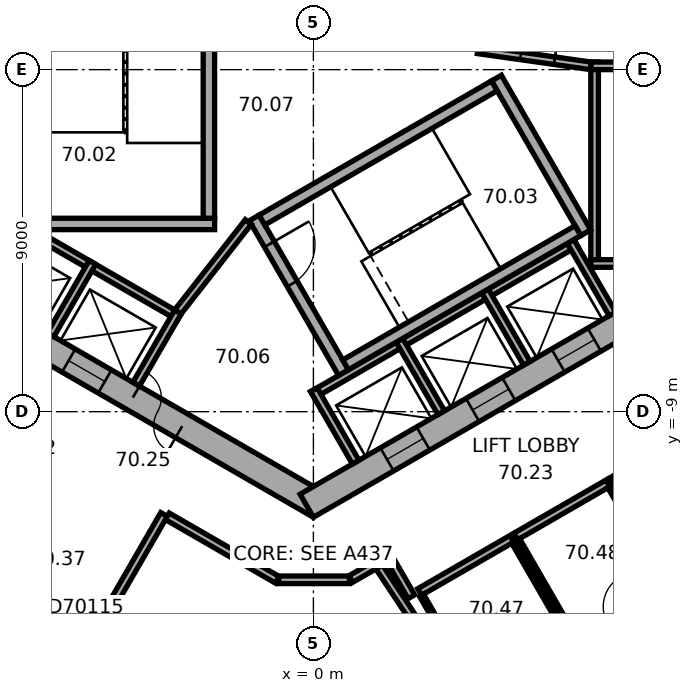
"""IFC4 building model, lengths in metres.
Left out: names, types, materials, properties, quantities, classifications, styles, units other than length and angle.
Written with IfcOpenShell. Run it as: python <this file> out.ifc"""

import sys

from ifc_helpers import new_model, si_unit, direction, frame, frame_2d, origin, place, context, subcontext, project, spatial, rectangle, extrude, element, fill, save


model = new_model("IFC4")
c1 = context("Model", 3, precision=1e-05, world=origin(), true_north=direction((0.0, 1.0)))
c2 = subcontext(c1, "Body", "Model", "MODEL_VIEW")
j1 = project(units=[si_unit("LENGTHUNIT", "METRE"), si_unit("PLANEANGLEUNIT", "RADIAN")], contexts=[c1])
p1 = place(None, origin())
s1 = spatial("IfcSite", under=j1, at=p1, CompositionType="ELEMENT")
p2 = place(p1, origin())
s2 = spatial("IfcBuilding", under=s1, at=p2, CompositionType="ELEMENT")
p3 = place(p2, frame((0.0, 0.0, 285.7)))
s3 = spatial("IfcBuildingStorey", under=s2, at=p3, CompositionType="ELEMENT", Elevation=285.7)
p4 = place(p3, frame((-10.025, -5.586, 0.0), z_axis=(0.0, 0.0, 1.0), x_axis=(0.866026453023, -0.499998182661, 0.0)))
e1 = element("IfcWall", 1, at=p4, inside=s3, PredefinedType="SHEAR", context=c2, shape_type="SweptSolid", body=[
    extrude(rectangle(XDim=11.778, YDim=0.7, at=frame_2d((5.889, 0.0))), origin(), (0.0, 0.0, 1.0), 3.7),
])
p5 = place(p4, frame((6.089, 0.0, 0.0)))
e2 = element("IfcOpeningElement", 2, at=p5, cuts=e1, PredefinedType="OPENING", context=c2, shape_type="SweptSolid", body=[
    extrude(rectangle(XDim=1.5, YDim=2.1, at=frame_2d((0.75, 1.05))), frame((0.0, 0.36, 0.0), z_axis=(0.0, -1.0, 0.0), x_axis=(1.0, 0.0, 0.0)), (0.0, 0.0, 1.0), 0.72),
])
p6 = place(p4, frame((1.539, 0.0, 0.0)))
e3 = element("IfcOpeningElement", 3, at=p6, cuts=e1, PredefinedType="OPENING", context=c2, shape_type="SweptSolid", body=[
    extrude(rectangle(XDim=1.1, YDim=2.1, at=frame_2d((0.55, 1.05))), frame((0.0, 0.36, 0.0), z_axis=(0.0, -1.0, 0.0), x_axis=(1.0, 0.0, 0.0)), (0.0, 0.0, 1.0), 0.72),
])
p7 = place(p4, frame((4.139, 0.0, 0.0)))
e4 = element("IfcOpeningElement", 4, at=p7, cuts=e1, PredefinedType="OPENING", context=c2, shape_type="SweptSolid", body=[
    extrude(rectangle(XDim=1.1, YDim=2.1, at=frame_2d((0.55, 1.05))), frame((0.0, 0.36, 0.0), z_axis=(0.0, -1.0, 0.0), x_axis=(1.0, 0.0, 0.0)), (0.0, 0.0, 1.0), 0.72),
])
p8 = place(p3, frame((-0.175, -11.475, 0.0), z_axis=(0.0, 0.0, 1.0), x_axis=(0.866026453023, 0.499998182661, 0.0)))
e5 = element("IfcWall", 5, at=p8, inside=s3, PredefinedType="SHEAR", context=c2, shape_type="SweptSolid", body=[
    extrude(rectangle(XDim=11.778, YDim=0.7, at=frame_2d((5.889, 0.0))), origin(), (0.0, 0.0, 1.0), 3.7),
])
p9 = place(p8, frame((2.439, 0.0, 0.0)))
e6 = element("IfcOpeningElement", 6, at=p9, cuts=e5, PredefinedType="OPENING", context=c2, shape_type="SweptSolid", body=[
    extrude(rectangle(XDim=1.1, YDim=2.1, at=frame_2d((0.55, 1.05))), frame((0.0, 0.36, 0.0), z_axis=(0.0, -1.0, 0.0), x_axis=(1.0, 0.0, 0.0)), (0.0, 0.0, 1.0), 0.72),
])
p10 = place(p8, frame((5.039, 0.0, 0.0)))
e7 = element("IfcOpeningElement", 7, at=p10, cuts=e5, PredefinedType="OPENING", context=c2, shape_type="SweptSolid", body=[
    extrude(rectangle(XDim=1.1, YDim=2.1, at=frame_2d((0.55, 1.05))), frame((0.0, 0.36, 0.0), z_axis=(0.0, -1.0, 0.0), x_axis=(1.0, 0.0, 0.0)), (0.0, 0.0, 1.0), 0.72),
])
p11 = place(p8, frame((7.639, 0.0, 0.0)))
e8 = element("IfcOpeningElement", 8, at=p11, cuts=e5, PredefinedType="OPENING", context=c2, shape_type="SweptSolid", body=[
    extrude(rectangle(XDim=1.1, YDim=2.1, at=frame_2d((0.55, 1.05))), frame((0.0, 0.36, 0.0), z_axis=(0.0, -1.0, 0.0), x_axis=(1.0, 0.0, 0.0)), (0.0, 0.0, 1.0), 0.72),
])
p12 = place(p3, frame((-16.626, -12.629, 0.0), z_axis=(0.0, 0.0, 1.0), x_axis=(0.866026460444, -0.499998169808, 0.0)))
e9 = element("IfcWall", 9, at=p12, inside=s3, PredefinedType="STANDARD", context=c2, shape_type="SweptSolid", body=[
    extrude(rectangle(XDim=17.731, YDim=0.2, at=frame_2d((8.866, 0.0))), origin(), (0.0, 0.0, 1.0), 3.7),
])
p13 = place(p12, frame((1.203, 0.0, 0.9)))
e10 = element("IfcOpeningElement", 10, at=p13, cuts=e9, PredefinedType="OPENING", context=c2, shape_type="SweptSolid", body=[
    extrude(rectangle(XDim=2.0, YDim=2.0, at=frame_2d((1.0, 1.0))), frame((0.0, 0.11, 0.0), z_axis=(0.0, -1.0, 0.0), x_axis=(1.0, 0.0, 0.0)), (0.0, 0.0, 1.0), 0.22),
])
p14 = place(p12, frame((4.535, 0.0, 0.9)))
e11 = element("IfcOpeningElement", 11, at=p14, cuts=e9, PredefinedType="OPENING", context=c2, shape_type="SweptSolid", body=[
    extrude(rectangle(XDim=2.0, YDim=2.0, at=frame_2d((1.0, 1.0))), frame((0.0, 0.11, 0.0), z_axis=(0.0, -1.0, 0.0), x_axis=(1.0, 0.0, 0.0)), (0.0, 0.0, 1.0), 0.22),
])
p15 = place(p12, frame((7.867, 0.0, 0.9)))
e12 = element("IfcOpeningElement", 12, at=p15, cuts=e9, PredefinedType="OPENING", context=c2, shape_type="SweptSolid", body=[
    extrude(rectangle(XDim=2.0, YDim=2.0, at=frame_2d((1.0, 1.0))), frame((0.0, 0.11, 0.0), z_axis=(0.0, -1.0, 0.0), x_axis=(1.0, 0.0, 0.0)), (0.0, 0.0, 1.0), 0.22),
])
p16 = place(p12, frame((11.198, 0.0, 0.9)))
e13 = element("IfcOpeningElement", 13, at=p16, cuts=e9, PredefinedType="OPENING", context=c2, shape_type="SweptSolid", body=[
    extrude(rectangle(XDim=2.0, YDim=2.0, at=frame_2d((1.0, 1.0))), frame((0.0, 0.11, 0.0), z_axis=(0.0, -1.0, 0.0), x_axis=(1.0, 0.0, 0.0)), (0.0, 0.0, 1.0), 0.22),
])
p17 = place(p12, frame((14.53, 0.0, 0.9)))
e14 = element("IfcOpeningElement", 14, at=p17, cuts=e9, PredefinedType="OPENING", context=c2, shape_type="SweptSolid", body=[
    extrude(rectangle(XDim=2.0, YDim=2.0, at=frame_2d((1.0, 1.0))), frame((0.0, 0.11, 0.0), z_axis=(0.0, -1.0, 0.0), x_axis=(1.0, 0.0, 0.0)), (0.0, 0.0, 1.0), 0.22),
])
p18 = place(p3, frame((2.58, -21.377, 0.0), z_axis=(0.0, 0.0, 1.0), x_axis=(0.833888592176, 0.551932800112, 0.0)))
e15 = element("IfcWall", 15, at=p18, inside=s3, PredefinedType="STANDARD", context=c2, shape_type="SweptSolid", body=[
    extrude(rectangle(XDim=17.731, YDim=0.2, at=frame_2d((8.866, 0.0))), origin(), (0.0, 0.0, 1.0), 3.7),
])
p19 = place(p18, frame((1.202, 0.0, 0.9)))
e16 = element("IfcOpeningElement", 16, at=p19, cuts=e15, PredefinedType="OPENING", context=c2, shape_type="SweptSolid", body=[
    extrude(rectangle(XDim=2.0, YDim=2.0, at=frame_2d((1.0, 1.0))), frame((0.0, 0.11, 0.0), z_axis=(0.0, -1.0, 0.0), x_axis=(1.0, 0.0, 0.0)), (0.0, 0.0, 1.0), 0.22),
])
p20 = place(p18, frame((4.533, 0.0, 0.9)))
e17 = element("IfcOpeningElement", 17, at=p20, cuts=e15, PredefinedType="OPENING", context=c2, shape_type="SweptSolid", body=[
    extrude(rectangle(XDim=2.0, YDim=2.0, at=frame_2d((1.0, 1.0))), frame((0.0, 0.11, 0.0), z_axis=(0.0, -1.0, 0.0), x_axis=(1.0, 0.0, 0.0)), (0.0, 0.0, 1.0), 0.22),
])
p21 = place(p18, frame((7.865, 0.0, 0.9)))
e18 = element("IfcOpeningElement", 18, at=p21, cuts=e15, PredefinedType="OPENING", context=c2, shape_type="SweptSolid", body=[
    extrude(rectangle(XDim=2.0, YDim=2.0, at=frame_2d((1.0, 1.0))), frame((0.0, 0.11, 0.0), z_axis=(0.0, -1.0, 0.0), x_axis=(1.0, 0.0, 0.0)), (0.0, 0.0, 1.0), 0.22),
])
p22 = place(p18, frame((11.197, 0.0, 0.9)))
e19 = element("IfcOpeningElement", 19, at=p22, cuts=e15, PredefinedType="OPENING", context=c2, shape_type="SweptSolid", body=[
    extrude(rectangle(XDim=2.0, YDim=2.0, at=frame_2d((1.0, 1.0))), frame((0.0, 0.11, 0.0), z_axis=(0.0, -1.0, 0.0), x_axis=(1.0, 0.0, 0.0)), (0.0, 0.0, 1.0), 0.22),
])
p23 = place(p18, frame((14.528, 0.0, 0.9)))
e20 = element("IfcOpeningElement", 20, at=p23, cuts=e15, PredefinedType="OPENING", context=c2, shape_type="SweptSolid", body=[
    extrude(rectangle(XDim=2.0, YDim=2.0, at=frame_2d((1.0, 1.0))), frame((0.0, 0.11, 0.0), z_axis=(0.0, -1.0, 0.0), x_axis=(1.0, 0.0, 0.0)), (0.0, 0.0, 1.0), 0.22),
])
p24 = place(p3, frame((7.4, -5.2, 0.0), z_axis=(0.0, 0.0, 1.0), x_axis=(0.0, 1.0, 0.0)))
e21 = element("IfcWall", 21, at=p24, inside=s3, PredefinedType="PARTITIONING", context=c2, shape_type="SweptSolid", body=[
    extrude(rectangle(XDim=5.4, YDim=0.2, at=frame_2d((2.7, 0.0))), origin(), (0.0, 0.0, 1.0), 3.42),
])
for number, where, z_axis, x_axis in (
    (22, (7.3, -5.1, 0.0), (0.0, 0.0, 1.0), (1.0, 0.0, 0.0)),
    (23, (7.3, 0.1, 0.0), (0.0, 0.0, 1.0), (1.0, 0.0, 0.0)),
):
    element("IfcWall", number, at=place(p3, frame(where, z_axis=z_axis, x_axis=x_axis)), inside=s3, PredefinedType="PARTITIONING", context=c2, shape_type="SweptSolid", body=[
        extrude(rectangle(XDim=2.2, YDim=0.2, at=frame_2d((1.1, 0.0))), origin(), (0.0, 0.0, 1.0), 3.42),
    ])
p25 = place(p3, frame((-8.203, -3.809, 0.0), z_axis=(0.0, 0.0, 1.0), x_axis=(0.866028230842, -0.499995103361, 0.0)))
e24 = element("IfcWall", 24, at=p25, inside=s3, PredefinedType="PARTITIONING", context=c2, shape_type="SweptSolid", body=[
    extrude(rectangle(XDim=5.4, YDim=0.2, at=frame_2d((2.7, 0.0))), origin(), (0.0, 0.0, 1.0), 3.42),
])
p26 = place(p3, frame((-5.815, -5.072, 0.0), z_axis=(0.0, 0.0, 1.0), x_axis=(-0.499946605688, -0.86605622881, 0.0)))
e25 = element("IfcWall", 25, at=p26, inside=s3, PredefinedType="PARTITIONING", context=c2, shape_type="SweptSolid", body=[
    extrude(rectangle(XDim=2.2, YDim=0.2, at=frame_2d((1.1, 0.0))), origin(), (0.0, 0.0, 1.0), 3.42),
])
p27 = place(p3, frame((-3.563, -6.372, 0.0), z_axis=(0.0, 0.0, 1.0), x_axis=(-0.499994660107, -0.866028486751, 0.0)))
e26 = element("IfcWall", 26, at=p27, inside=s3, PredefinedType="PARTITIONING", context=c2, shape_type="SweptSolid", body=[
    extrude(rectangle(XDim=2.2, YDim=0.2, at=frame_2d((1.1, 0.0))), origin(), (0.0, 0.0, 1.0), 3.42),
])
p28 = place(p3, frame((-0.024, -8.559, 0.0), z_axis=(0.0, 0.0, 1.0), x_axis=(0.866026010844, 0.49999894854, 0.0)))
e27 = element("IfcWall", 27, at=p28, inside=s3, PredefinedType="PARTITIONING", context=c2, shape_type="SweptSolid", body=[
    extrude(rectangle(XDim=8.0, YDim=0.2, at=frame_2d((4.0, 0.0))), origin(), (0.0, 0.0, 1.0), 3.42),
])
for number, where, z_axis, x_axis in (
    (28, (0.013, -8.422, 0.0), (0.0, 0.0, 1.0), (0.5, -0.866, 0.0)),
    (29, (2.264, -7.122, 0.0), (0.0, 0.0, 1.0), (0.5, -0.866, 0.0)),
    (30, (4.516, -5.822, 0.0), (0.0, 0.0, 1.0), (0.5, -0.866, 0.0)),
    (31, (6.768, -4.522, 0.0), (0.0, 0.0, 1.0), (0.5, -0.866, 0.0)),
):
    element("IfcWall", number, at=place(p3, frame(where, z_axis=z_axis, x_axis=x_axis)), inside=s3, PredefinedType="PARTITIONING", context=c2, shape_type="SweptSolid", body=[
        extrude(rectangle(XDim=2.2, YDim=0.2, at=frame_2d((1.1, 0.0))), origin(), (0.0, 0.0, 1.0), 3.42),
    ])
p29 = place(p3, frame((-2.6, -4.06, 0.0), z_axis=(0.0, 0.0, 1.0), x_axis=(-1.0, 0.0, 0.0)))
e32 = element("IfcWall", 32, at=p29, inside=s3, PredefinedType="SHEAR", context=c2, shape_type="SweptSolid", body=[
    extrude(rectangle(XDim=4.7, YDim=0.3, at=frame_2d((2.35, 0.0))), origin(), (0.0, 0.0, 1.0), 3.42),
])
p30 = place(p3, frame((-2.75, 3.15, 0.0), z_axis=(0.0, 0.0, 1.0), x_axis=(0.0, -1.0, 0.0)))
e33 = element("IfcWall", 33, at=p30, inside=s3, PredefinedType="SHEAR", context=c2, shape_type="SweptSolid", body=[
    extrude(rectangle(XDim=7.06, YDim=0.3, at=frame_2d((3.53, 0.0))), origin(), (0.0, 0.0, 1.0), 3.42),
])
p31 = place(p3, frame((-1.558, -3.902, 0.0), z_axis=(0.0, 0.0, 1.0), x_axis=(0.499977259774, -0.866038532462, 0.0)))
e34 = element("IfcWall", 34, at=p31, inside=s3, PredefinedType="SHEAR", context=c2, shape_type="SweptSolid", body=[
    extrude(rectangle(XDim=4.7, YDim=0.3, at=frame_2d((2.35, 0.0))), origin(), (0.0, 0.0, 1.0), 3.42),
])
p32 = place(p31, frame((0.8, 0.0, 0.0)))
e35 = element("IfcOpeningElement", 35, at=p32, cuts=e34, PredefinedType="OPENING", context=c2, shape_type="SweptSolid", body=[
    extrude(rectangle(XDim=1.2, YDim=2.1, at=frame_2d((0.6, 1.05))), frame((0.0, 0.16, 0.0), z_axis=(0.0, -1.0, 0.0), x_axis=(1.0, 0.0, 0.0)), (0.0, 0.0, 1.0), 0.32),
])
p33 = place(p3, frame((4.816, -0.222, 0.0), z_axis=(0.0, 0.0, 1.0), x_axis=(0.499977259774, -0.866038532462, 0.0)))
e36 = element("IfcWall", 36, at=p33, inside=s3, PredefinedType="SHEAR", context=c2, shape_type="SweptSolid", body=[
    extrude(rectangle(XDim=4.7, YDim=0.3, at=frame_2d((2.35, 0.0))), origin(), (0.0, 0.0, 1.0), 3.42),
])
for number, where, z_axis, x_axis in (
    (37, (-1.353, -3.957, 0.0), (0.0, 0.0, 1.0), (0.866, 0.5, 0.0)),
    (38, (0.847, -7.767, 0.0), (0.0, 0.0, 1.0), (0.866, 0.5, 0.0)),
):
    element("IfcWall", number, at=place(p3, frame(where, z_axis=z_axis, x_axis=x_axis)), inside=s3, PredefinedType="SHEAR", context=c2, shape_type="SweptSolid", body=[
        extrude(rectangle(XDim=7.06, YDim=0.3, at=frame_2d((3.53, 0.0))), origin(), (0.0, 0.0, 1.0), 3.42),
    ])
p34 = place(p3, frame((4.327, 0.521, 0.0), z_axis=(0.0, 0.0, 1.0), x_axis=(0.990124376366, -0.14019172346, 0.0)))
e39 = element("IfcWall", 39, at=p34, inside=s3, PredefinedType="PARTITIONING", context=c2, shape_type="SweptSolid", body=[
    extrude(rectangle(XDim=3.002, YDim=0.2, at=frame_2d((1.501, 0.0))), origin(), (0.0, 0.0, 1.0), 3.42),
])
p35 = place(p34, frame((1.138, 0.0, 0.0)))
e40 = element("IfcOpeningElement", 40, at=p35, cuts=e39, PredefinedType="OPENING", context=c2, shape_type="SweptSolid", body=[
    extrude(rectangle(XDim=0.9, YDim=2.1, at=frame_2d((0.45, 1.05))), frame((0.0, 0.11, 0.0), z_axis=(0.0, -1.0, 0.0), x_axis=(1.0, 0.0, 0.0)), (0.0, 0.0, 1.0), 0.22),
])
p36 = place(p3, frame((-1.712, -4.008, 0.0), z_axis=(0.0, 0.0, 1.0), x_axis=(-0.616549420702, -0.787316208287, 0.0)))
e41 = element("IfcWall", 41, at=p36, inside=s3, PredefinedType="PARTITIONING", context=c2, shape_type="SweptSolid", body=[
    extrude(rectangle(XDim=3.002, YDim=0.2, at=frame_2d((1.501, 0.0))), origin(), (0.0, 0.0, 1.0), 3.42),
])
p37 = place(p3, frame((-7.105, -17.202, 0.0), z_axis=(0.0, 0.0, 1.0), x_axis=(0.499988692146, 0.866031932279, 0.0)))
e42 = element("IfcWall", 42, at=p37, inside=s3, PredefinedType="PARTITIONING", context=c2, shape_type="SweptSolid", body=[
    extrude(rectangle(XDim=6.35, YDim=0.2, at=frame_2d((3.175, 0.0))), origin(), (0.0, 0.0, 1.0), 3.42),
])
p38 = place(p37, frame((2.675, 0.0, 0.0)))
e43 = element("IfcOpeningElement", 43, at=p38, cuts=e42, PredefinedType="OPENING", context=c2, shape_type="SweptSolid", body=[
    extrude(rectangle(XDim=1.0, YDim=2.1, at=frame_2d((0.5, 1.05))), frame((0.0, 0.11, 0.0), z_axis=(0.0, -1.0, 0.0), x_axis=(1.0, 0.0, 0.0)), (0.0, 0.0, 1.0), 0.22),
])
p39 = place(p3, frame((-3.843, -11.753, 0.0), z_axis=(0.0, 0.0, 1.0), x_axis=(0.866031037473, -0.499990242038, 0.0)))
e44 = element("IfcWall", 44, at=p39, inside=s3, PredefinedType="PARTITIONING", context=c2, shape_type="SweptSolid", body=[
    extrude(rectangle(XDim=3.341, YDim=0.2, at=frame_2d((1.67, 0.0))), origin(), (0.0, 0.0, 1.0), 3.42),
])
p40 = place(p3, frame((-0.91, -13.423, 0.0), z_axis=(0.0, 0.0, 1.0), x_axis=(1.0, 0.0, 0.0)))
e45 = element("IfcWall", 45, at=p40, inside=s3, PredefinedType="PARTITIONING", context=c2, shape_type="SweptSolid", body=[
    extrude(rectangle(XDim=1.86, YDim=0.2, at=frame_2d((0.93, 0.0))), origin(), (0.0, 0.0, 1.0), 3.42),
])
p41 = place(p3, frame((0.985, -13.403, 0.0), z_axis=(0.0, 0.0, 1.0), x_axis=(0.866032814021, 0.499987164874, 0.0)))
e46 = element("IfcWall", 46, at=p41, inside=s3, PredefinedType="PARTITIONING", context=c2, shape_type="SweptSolid", body=[
    extrude(rectangle(XDim=0.798, YDim=0.2, at=frame_2d((0.399, 0.0))), origin(), (0.0, 0.0, 1.0), 3.42),
])
p42 = place(p3, frame((1.979, -12.829, 0.0), z_axis=(0.0, 0.0, 1.0), x_axis=(0.500074377092, -0.865982457891, 0.0)))
e47 = element("IfcWall", 47, at=p42, inside=s3, PredefinedType="PARTITIONING", context=c2, shape_type="SweptSolid", body=[
    extrude(rectangle(XDim=1.201, YDim=0.2, at=frame_2d((0.601, 0.0))), origin(), (0.0, 0.0, 1.0), 3.42),
])
p43 = place(p3, frame((2.796, -13.744, 0.0), z_axis=(0.0, 0.0, 1.0), x_axis=(0.866034573852, 0.49998411664, 0.0)))
e48 = element("IfcWall", 48, at=p43, inside=s3, PredefinedType="PARTITIONING", context=c2, shape_type="SweptSolid", body=[
    extrude(rectangle(XDim=2.8, YDim=0.2, at=frame_2d((1.4, 0.0))), origin(), (0.0, 0.0, 1.0), 3.42),
])
p44 = place(p3, frame((4.396, -16.516, 0.0), z_axis=(0.0, 0.0, 1.0), x_axis=(-0.49999285859, 0.86602952684, 0.0)))
e49 = element("IfcWall", 49, at=p44, inside=s3, PredefinedType="PARTITIONING", context=c2, shape_type="SweptSolid", body=[
    extrude(rectangle(XDim=3.1, YDim=0.12, at=frame_2d((1.55, 0.0))), origin(), (0.0, 0.0, 1.0), 3.42),
])
p45 = place(p3, frame((5.271, -12.431, 0.0), z_axis=(0.0, 0.0, 1.0), x_axis=(0.500026960575, -0.86600983753, 0.0)))
e50 = element("IfcWall", 50, at=p45, inside=s3, PredefinedType="PARTITIONING", context=c2, shape_type="SweptSolid", body=[
    extrude(rectangle(XDim=3.1, YDim=0.12, at=frame_2d((1.55, 0.0))), origin(), (0.0, 0.0, 1.0), 3.42),
])
p46 = place(p3, frame((5.325, -12.284, 0.0), z_axis=(0.0, 0.0, 1.0), x_axis=(0.866034573852, 0.49998411664, 0.0)))
e51 = element("IfcWall", 51, at=p46, inside=s3, PredefinedType="PARTITIONING", context=c2, shape_type="SweptSolid", body=[
    extrude(rectangle(XDim=2.8, YDim=0.2, at=frame_2d((1.4, 0.0))), origin(), (0.0, 0.0, 1.0), 3.42),
])
p47 = place(p3, frame((5.364, -18.575, 0.0), z_axis=(0.0, 0.0, 1.0), x_axis=(-0.55195757761, 0.833872191957, 0.0)))
e52 = element("IfcWall", 52, at=p47, inside=s3, PredefinedType="PARTITIONING", context=c2, shape_type="SweptSolid", body=[
    extrude(rectangle(XDim=6.581, YDim=0.2, at=frame_2d((3.291, 0.0))), origin(), (0.0, 0.0, 1.0), 3.42),
])
p48 = place(p3, frame((6.925, -15.056, 0.0), z_axis=(0.0, 0.0, 1.0), x_axis=(-0.49999285859, 0.86602952684, 0.0)))
e53 = element("IfcWall", 53, at=p48, inside=s3, PredefinedType="PARTITIONING", context=c2, shape_type="SweptSolid", body=[
    extrude(rectangle(XDim=3.1, YDim=0.12, at=frame_2d((1.55, 0.0))), origin(), (0.0, 0.0, 1.0), 2.87),
])
p49 = place(p3, frame((7.8, -10.971, 0.0), z_axis=(0.0, 0.0, 1.0), x_axis=(0.500026960575, -0.86600983753, 0.0)))
e54 = element("IfcWall", 54, at=p49, inside=s3, PredefinedType="PARTITIONING", context=c2, shape_type="SweptSolid", body=[
    extrude(rectangle(XDim=3.1, YDim=0.12, at=frame_2d((1.55, 0.0))), origin(), (0.0, 0.0, 1.0), 3.42),
])
p50 = place(p3, frame((7.854, -10.824, 0.0), z_axis=(0.0, 0.0, 1.0), x_axis=(0.866029675718, 0.499992600721, 0.0)))
e55 = element("IfcWall", 55, at=p50, inside=s3, PredefinedType="PARTITIONING", context=c2, shape_type="SweptSolid", body=[
    extrude(rectangle(XDim=2.712, YDim=0.2, at=frame_2d((1.356, 0.0))), origin(), (0.0, 0.0, 1.0), 3.42),
])
p51 = place(p3, frame((9.153, -13.076, 0.0), z_axis=(0.0, 0.0, 1.0), x_axis=(-0.500004234368, 0.866022959057, 0.0)))
e56 = element("IfcWall", 56, at=p51, inside=s3, PredefinedType="PARTITIONING", context=c2, shape_type="SweptSolid", body=[
    extrude(rectangle(XDim=2.5, YDim=0.12, at=frame_2d((1.25, 0.0))), origin(), (0.0, 0.0, 1.0), 3.42),
])
p52 = place(p3, frame((9.298, -13.686, 0.0), z_axis=(0.0, 0.0, 1.0), x_axis=(-0.866020236886, -0.500008949224, 0.0)))
e57 = element("IfcWall", 57, at=p52, inside=s3, PredefinedType="PARTITIONING", context=c2, shape_type="SweptSolid", body=[
    extrude(rectangle(XDim=2.68, YDim=0.12, at=frame_2d((1.34, 0.0))), origin(), (0.0, 0.0, 1.0), 3.42),
])
p53 = place(p52, frame((0.89, 0.0, 0.0)))
e58 = element("IfcOpeningElement", 58, at=p53, cuts=e57, PredefinedType="OPENING", context=c2, shape_type="SweptSolid", body=[
    extrude(rectangle(XDim=0.9, YDim=2.1, at=frame_2d((0.45, 1.05))), frame((0.0, 0.07, 0.0), z_axis=(0.0, -1.0, 0.0), x_axis=(1.0, 0.0, 0.0)), (0.0, 0.0, 1.0), 0.14),
])
p54 = place(p5, origin())
e59 = element("IfcDoor", 59, at=p54, inside=s3, OperationType="DOUBLE_DOOR_SINGLE_SWING", PredefinedType="DOOR", context=c2, shape_type="SweptSolid", body=[
    extrude(rectangle(XDim=1.5, YDim=2.1, at=frame_2d((0.75, 1.05))), frame((0.0, 0.025, 0.0), z_axis=(0.0, -1.0, 0.0), x_axis=(1.0, 0.0, 0.0)), (0.0, 0.0, 1.0), 0.05),
])
fill(e2, e59)
p55 = place(p32, origin())
e60 = element("IfcDoor", 60, at=p55, inside=s3, OperationType="SINGLE_SWING_RIGHT", PredefinedType="DOOR", context=c2, shape_type="SweptSolid", body=[
    extrude(rectangle(XDim=1.2, YDim=2.1, at=frame_2d((0.6, 1.05))), frame((0.0, 0.025, 0.0), z_axis=(0.0, -1.0, 0.0), x_axis=(1.0, 0.0, 0.0)), (0.0, 0.0, 1.0), 0.05),
])
fill(e35, e60)
p56 = place(p35, origin())
e61 = element("IfcDoor", 61, at=p56, inside=s3, OperationType="SINGLE_SWING_LEFT", PredefinedType="DOOR", context=c2, shape_type="SweptSolid", body=[
    extrude(rectangle(XDim=0.9, YDim=2.1, at=frame_2d((0.45, 1.05))), frame((0.0, 0.025, 0.0), z_axis=(0.0, -1.0, 0.0), x_axis=(1.0, 0.0, 0.0)), (0.0, 0.0, 1.0), 0.05),
])
fill(e40, e61)
p57 = place(p7, origin())
e62 = element("IfcDoor", 62, at=p57, inside=s3, OperationType="DOUBLE_DOOR_SLIDING", PredefinedType="DOOR", context=c2, shape_type="SweptSolid", body=[
    extrude(rectangle(XDim=1.1, YDim=2.1, at=frame_2d((0.55, 1.05))), frame((0.0, 0.025, 0.0), z_axis=(0.0, -1.0, 0.0), x_axis=(1.0, 0.0, 0.0)), (0.0, 0.0, 1.0), 0.05),
])
fill(e4, e62)
p58 = place(p9, origin())
e63 = element("IfcDoor", 63, at=p58, inside=s3, OperationType="DOUBLE_DOOR_SLIDING", PredefinedType="DOOR", context=c2, shape_type="SweptSolid", body=[
    extrude(rectangle(XDim=1.1, YDim=2.1, at=frame_2d((0.55, 1.05))), frame((0.0, 0.025, 0.0), z_axis=(0.0, -1.0, 0.0), x_axis=(1.0, 0.0, 0.0)), (0.0, 0.0, 1.0), 0.05),
])
fill(e6, e63)
p59 = place(p10, origin())
e64 = element("IfcDoor", 64, at=p59, inside=s3, OperationType="DOUBLE_DOOR_SLIDING", PredefinedType="DOOR", context=c2, shape_type="SweptSolid", body=[
    extrude(rectangle(XDim=1.1, YDim=2.1, at=frame_2d((0.55, 1.05))), frame((0.0, 0.025, 0.0), z_axis=(0.0, -1.0, 0.0), x_axis=(1.0, 0.0, 0.0)), (0.0, 0.0, 1.0), 0.05),
])
fill(e7, e64)
p60 = place(p11, origin())
e65 = element("IfcDoor", 65, at=p60, inside=s3, OperationType="DOUBLE_DOOR_SLIDING", PredefinedType="DOOR", context=c2, shape_type="SweptSolid", body=[
    extrude(rectangle(XDim=1.1, YDim=2.1, at=frame_2d((0.55, 1.05))), frame((0.0, 0.025, 0.0), z_axis=(0.0, -1.0, 0.0), x_axis=(1.0, 0.0, 0.0)), (0.0, 0.0, 1.0), 0.05),
])
fill(e8, e65)
p61 = place(p38, origin())
e66 = element("IfcDoor", 66, at=p61, inside=s3, OperationType="SINGLE_SWING_LEFT", PredefinedType="DOOR", context=c2, shape_type="SweptSolid", body=[
    extrude(rectangle(XDim=1.0, YDim=2.1, at=frame_2d((0.5, 1.05))), frame((0.0, 0.025, 0.0), z_axis=(0.0, -1.0, 0.0), x_axis=(1.0, 0.0, 0.0)), (0.0, 0.0, 1.0), 0.05),
])
fill(e43, e66)
p62 = place(p53, origin())
e67 = element("IfcDoor", 67, at=p62, inside=s3, OperationType="SINGLE_SWING_LEFT", PredefinedType="DOOR", context=c2, shape_type="SweptSolid", body=[
    extrude(rectangle(XDim=0.9, YDim=2.1, at=frame_2d((0.45, 1.05))), frame((0.0, 0.025, 0.0), z_axis=(0.0, -1.0, 0.0), x_axis=(1.0, 0.0, 0.0)), (0.0, 0.0, 1.0), 0.05),
])
fill(e58, e67)
save(model, sys.argv[1])
